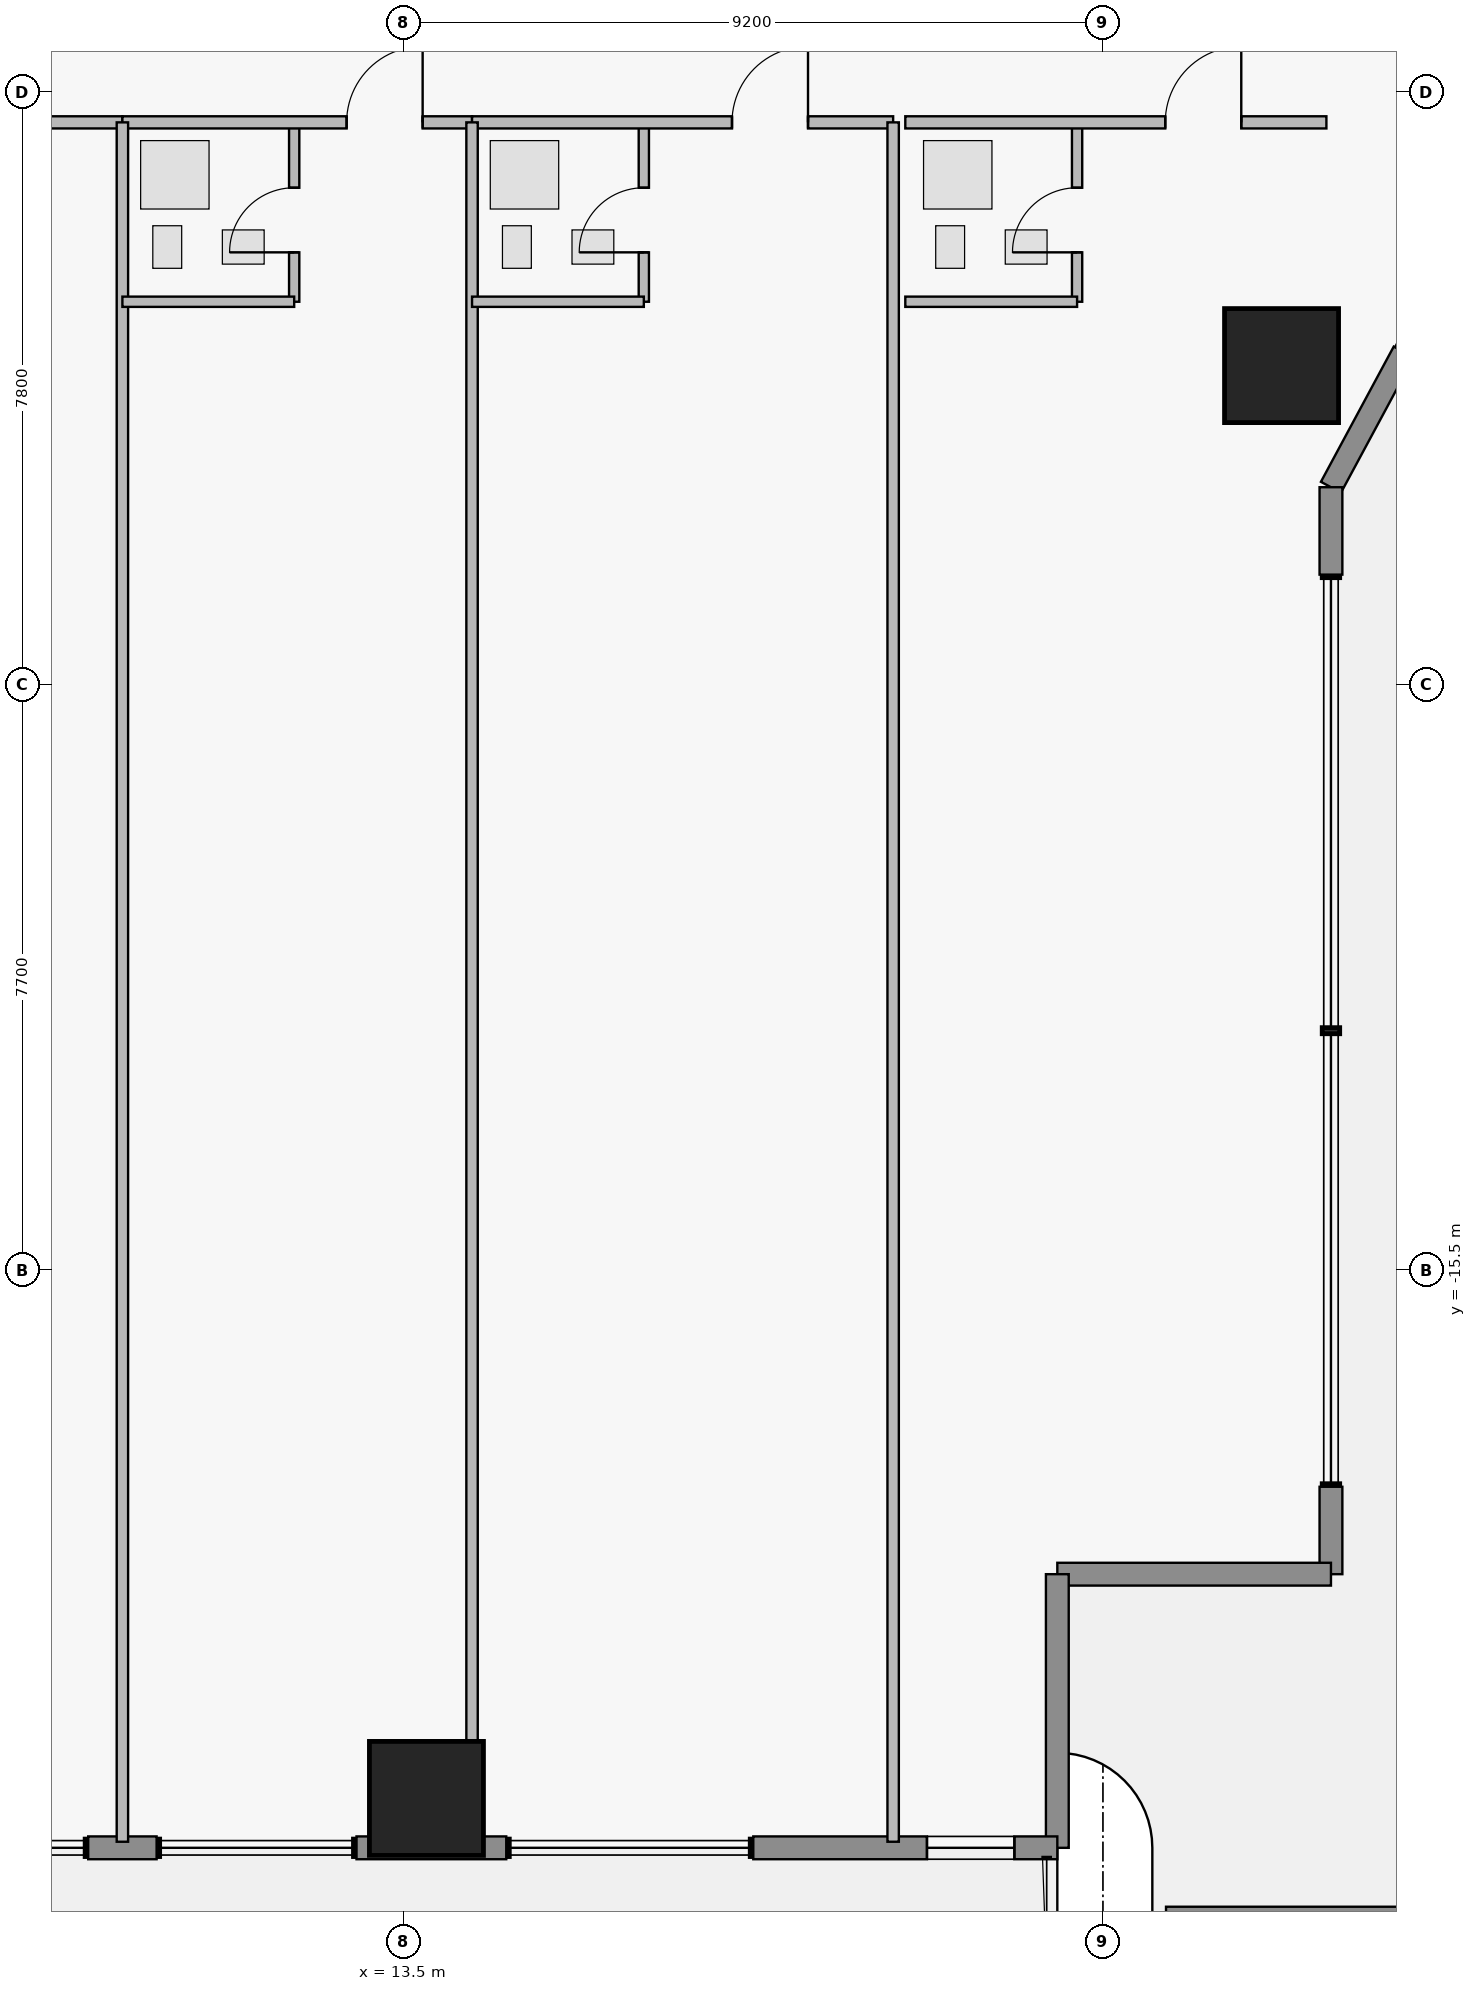
"""IFC4 building model, lengths in metres.
Left out: names, types, materials, properties, quantities, classifications, styles, units other than length and angle.
Written with IfcOpenShell. Run it as: python <this file> out.ifc"""

import sys

from ifc_helpers import new_model, si_unit, direction, frame, frame_2d, origin, origin_2d, place, context, subcontext, project, spatial, rectangle, extrude, element, fill, save


model = new_model("IFC4")
c1 = context("Model", 3, precision=1e-05, world=origin(), true_north=direction((0.0, 1.0)))
c2 = subcontext(c1, "Body", "Model", "MODEL_VIEW")
j1 = project(units=[si_unit("LENGTHUNIT", "METRE"), si_unit("PLANEANGLEUNIT", "RADIAN")], contexts=[c1])
p1 = place(None, origin())
s1 = spatial("IfcSite", under=j1, at=p1, CompositionType="ELEMENT")
p2 = place(p1, origin())
s2 = spatial("IfcBuilding", under=s1, at=p2, CompositionType="ELEMENT")
p3 = place(p2, frame((0.0, 0.0, 27.6)))
s3 = spatial("IfcBuildingStorey", under=s2, at=p3, CompositionType="ELEMENT", Elevation=27.6)
for number, where, z_axis, x_axis in (
    (1, (13.8, -22.45, 0.0), (0.0, 0.0, 1.0), (1.0, 0.0, 0.0)),
    (2, (25.05, -3.6, 0.0), (0.0, 0.0, 1.0), (1.0, 0.0, 0.0)),
):
    element("IfcColumn", number, at=place(p3, frame(where, z_axis=z_axis, x_axis=x_axis)), inside=s3, PredefinedType="COLUMN", context=c2, shape_type="SweptSolid", body=[
        extrude(rectangle(XDim=1.5, YDim=1.5, at=origin_2d()), origin(), (0.0, 0.0, 1.0), 3.65),
    ])
p4 = place(p3, frame((31.82, -24.0, 0.0), z_axis=(0.0, 0.0, 1.0), x_axis=(-1.0, 0.0, 0.0)))
e3 = element("IfcWall", 3, at=p4, inside=s3, PredefinedType="PARAPET", context=c2, shape_type="SweptSolid", body=[
    extrude(rectangle(XDim=8.29, YDim=0.25, at=frame_2d((4.145, 0.0))), origin(), (0.0, 0.0, 1.0), 1.15),
])
p5 = place(p3, frame((25.7, 5.2, 0.0), z_axis=(0.0, 0.0, 1.0), x_axis=(0.474109683532, -0.880465790352, 0.0)))
e4 = element("IfcWall", 4, at=p5, inside=s3, PredefinedType="STANDARD", context=c2, shape_type="SweptSolid", body=[
    extrude(rectangle(XDim=5.906, YDim=0.3, at=frame_2d((2.953, 0.0))), origin(), (0.0, 0.0, 1.0), 3.43),
])
p6 = place(p5, frame((2.324, 0.0, 0.95)))
e5 = element("IfcOpeningElement", 5, at=p6, cuts=e4, PredefinedType="OPENING", context=c2, shape_type="SweptSolid", body=[
    extrude(rectangle(XDim=1.15, YDim=1.55, at=frame_2d((0.575, 0.775))), frame((0.0, 0.16, 0.0), z_axis=(0.0, -1.0, 0.0), x_axis=(1.0, 0.0, 0.0)), (0.0, 0.0, 1.0), 0.32),
])
p7 = place(p3, frame((26.658, -3.421, 0.0), z_axis=(0.0, 0.0, 1.0), x_axis=(-0.474121438562, -0.88045946045, 0.0)))
e6 = element("IfcWall", 6, at=p7, inside=s3, PredefinedType="STANDARD", context=c2, shape_type="SweptSolid", body=[
    extrude(rectangle(XDim=2.021, YDim=0.3, at=frame_2d((1.01, 0.0))), origin(), (0.0, 0.0, 1.0), 3.43),
])
p8 = place(p3, frame((25.7, -5.2, 0.0), z_axis=(0.0, 0.0, 1.0), x_axis=(0.0, -1.0, 0.0)))
e7 = element("IfcWall", 7, at=p8, inside=s3, PredefinedType="STANDARD", context=c2, shape_type="SweptSolid", body=[
    extrude(rectangle(XDim=1.15, YDim=0.3, at=frame_2d((0.575, 0.0))), origin(), (0.0, 0.0, 1.0), 3.43),
])
p9 = place(p3, frame((25.7, -18.35, 0.0), z_axis=(0.0, 0.0, 1.0), x_axis=(0.0, -1.0, 0.0)))
e8 = element("IfcWall", 8, at=p9, inside=s3, PredefinedType="STANDARD", context=c2, shape_type="SweptSolid", body=[
    extrude(rectangle(XDim=1.15, YDim=0.3, at=frame_2d((0.575, 0.0))), origin(), (0.0, 0.0, 1.0), 3.43),
])
p10 = place(p3, frame((25.7, -19.5, 0.0), z_axis=(0.0, 0.0, 1.0), x_axis=(-1.0, 0.0, 0.0)))
e9 = element("IfcWall", 9, at=p10, inside=s3, PredefinedType="STANDARD", context=c2, shape_type="SweptSolid", body=[
    extrude(rectangle(XDim=3.6, YDim=0.3, at=frame_2d((1.8, 0.0))), origin(), (0.0, 0.0, 1.0), 3.43),
])
p11 = place(p3, frame((22.1, -19.5, 0.0), z_axis=(0.0, 0.0, 1.0), x_axis=(0.0, -1.0, 0.0)))
e10 = element("IfcWall", 10, at=p11, inside=s3, PredefinedType="STANDARD", context=c2, shape_type="SweptSolid", body=[
    extrude(rectangle(XDim=3.6, YDim=0.3, at=frame_2d((1.8, 0.0))), origin(), (0.0, 0.0, 1.0), 3.43),
])
p12 = place(p3, frame((22.1, -23.1, 0.0), z_axis=(0.0, 0.0, 1.0), x_axis=(-1.0, 0.0, 0.0)))
e11 = element("IfcWall", 11, at=p12, inside=s3, PredefinedType="STANDARD", context=c2, shape_type="SweptSolid", body=[
    extrude(rectangle(XDim=4.0, YDim=0.3, at=frame_2d((2.0, 0.0))), origin(), (0.0, 0.0, 1.0), 3.43),
])
p13 = place(p12, frame((0.565, 0.0, 0.95)))
e12 = element("IfcOpeningElement", 12, at=p13, cuts=e11, PredefinedType="OPENING", context=c2, shape_type="SweptSolid", body=[
    extrude(rectangle(XDim=1.15, YDim=1.55, at=frame_2d((0.575, 0.775))), frame((0.0, 0.16, 0.0), z_axis=(0.0, -1.0, 0.0), x_axis=(1.0, 0.0, 0.0)), (0.0, 0.0, 1.0), 0.32),
])
p14 = place(p3, frame((14.85, -23.1, 0.0), z_axis=(0.0, 0.0, 1.0), x_axis=(-1.0, 0.0, 0.0)))
e13 = element("IfcWall", 13, at=p14, inside=s3, PredefinedType="STANDARD", context=c2, shape_type="SweptSolid", body=[
    extrude(rectangle(XDim=1.97, YDim=0.3, at=frame_2d((0.985, 0.0))), origin(), (0.0, 0.0, 1.0), 3.43),
])
p15 = place(p3, frame((10.25, -23.1, 0.0), z_axis=(0.0, 0.0, 1.0), x_axis=(-1.0, 0.0, 0.0)))
e14 = element("IfcWall", 14, at=p15, inside=s3, PredefinedType="STANDARD", context=c2, shape_type="SweptSolid", body=[
    extrude(rectangle(XDim=0.9, YDim=0.3, at=frame_2d((0.45, 0.0))), origin(), (0.0, 0.0, 1.0), 3.43),
])
p16 = place(p3, frame((4.0, -0.4, 0.0), z_axis=(0.0, 0.0, 1.0), x_axis=(1.0, 0.0, 0.0)))
e15 = element("IfcWall", 15, at=p16, inside=s3, PredefinedType="PARTITIONING", context=c2, shape_type="SweptSolid", body=[
    extrude(rectangle(XDim=5.8, YDim=0.16, at=frame_2d((2.9, 0.0))), origin(), (0.0, 0.0, 1.0), 3.43),
])
p17 = place(p16, frame((3.55, 0.0, 0.0)))
e16 = element("IfcOpeningElement", 16, at=p17, cuts=e15, PredefinedType="OPENING", context=c2, shape_type="SweptSolid", body=[
    extrude(rectangle(XDim=1.0, YDim=2.15, at=frame_2d((0.5, 1.075))), frame((0.0, 0.09, 0.0), z_axis=(0.0, -1.0, 0.0), x_axis=(1.0, 0.0, 0.0)), (0.0, 0.0, 1.0), 0.18),
])
p18 = place(p3, frame((12.06, -2.76, 0.0), z_axis=(0.0, 0.0, 1.0), x_axis=(0.0, 1.0, 0.0)))
e17 = element("IfcWall", 17, at=p18, inside=s3, PredefinedType="PLUMBINGWALL", context=c2, shape_type="SweptSolid", body=[
    extrude(rectangle(XDim=2.36, YDim=0.135, at=frame_2d((1.18, 0.0))), origin(), (0.0, 0.0, 1.0), 3.43),
])
p19 = place(p18, frame((0.65, 0.0, 0.0)))
e18 = element("IfcOpeningElement", 18, at=p19, cuts=e17, PredefinedType="OPENING", context=c2, shape_type="SweptSolid", body=[
    extrude(rectangle(XDim=0.85, YDim=2.1, at=frame_2d((0.425, 1.05))), frame((0.0, 0.077, 0.0), z_axis=(0.0, -1.0, 0.0), x_axis=(1.0, 0.0, 0.0)), (0.0, 0.0, 1.0), 0.155),
])
p20 = place(p3, frame((9.8, -0.4, 0.0), z_axis=(0.0, 0.0, 1.0), x_axis=(1.0, 0.0, 0.0)))
e19 = element("IfcWall", 19, at=p20, inside=s3, PredefinedType="PARTITIONING", context=c2, shape_type="SweptSolid", body=[
    extrude(rectangle(XDim=4.6, YDim=0.16, at=frame_2d((2.3, 0.0))), origin(), (0.0, 0.0, 1.0), 3.43),
])
p21 = place(p20, frame((2.95, 0.0, 0.0)))
e20 = element("IfcOpeningElement", 20, at=p21, cuts=e19, PredefinedType="OPENING", context=c2, shape_type="SweptSolid", body=[
    extrude(rectangle(XDim=1.0, YDim=2.15, at=frame_2d((0.5, 1.075))), frame((0.0, 0.09, 0.0), z_axis=(0.0, -1.0, 0.0), x_axis=(1.0, 0.0, 0.0)), (0.0, 0.0, 1.0), 0.18),
])
p22 = place(p3, frame((16.66, -2.76, 0.0), z_axis=(0.0, 0.0, 1.0), x_axis=(0.0, 1.0, 0.0)))
e21 = element("IfcWall", 21, at=p22, inside=s3, PredefinedType="PLUMBINGWALL", context=c2, shape_type="SweptSolid", body=[
    extrude(rectangle(XDim=2.36, YDim=0.135, at=frame_2d((1.18, 0.0))), origin(), (0.0, 0.0, 1.0), 3.43),
])
p23 = place(p22, frame((0.65, 0.0, 0.0)))
e22 = element("IfcOpeningElement", 22, at=p23, cuts=e21, PredefinedType="OPENING", context=c2, shape_type="SweptSolid", body=[
    extrude(rectangle(XDim=0.85, YDim=2.1, at=frame_2d((0.425, 1.05))), frame((0.0, 0.077, 0.0), z_axis=(0.0, -1.0, 0.0), x_axis=(1.0, 0.0, 0.0)), (0.0, 0.0, 1.0), 0.155),
])
p24 = place(p3, frame((14.4, -0.4, 0.0), z_axis=(0.0, 0.0, 1.0), x_axis=(1.0, 0.0, 0.0)))
e23 = element("IfcWall", 23, at=p24, inside=s3, PredefinedType="PARTITIONING", context=c2, shape_type="SweptSolid", body=[
    extrude(rectangle(XDim=5.54, YDim=0.16, at=frame_2d((2.77, 0.0))), origin(), (0.0, 0.0, 1.0), 3.43),
])
p25 = place(p24, frame((3.42, 0.0, 0.0)))
e24 = element("IfcOpeningElement", 24, at=p25, cuts=e23, PredefinedType="OPENING", context=c2, shape_type="SweptSolid", body=[
    extrude(rectangle(XDim=1.0, YDim=2.15, at=frame_2d((0.5, 1.075))), frame((0.0, 0.09, 0.0), z_axis=(0.0, -1.0, 0.0), x_axis=(1.0, 0.0, 0.0)), (0.0, 0.0, 1.0), 0.18),
])
p26 = place(p3, frame((22.36, -2.76, 0.0), z_axis=(0.0, 0.0, 1.0), x_axis=(0.0, 1.0, 0.0)))
e25 = element("IfcWall", 25, at=p26, inside=s3, PredefinedType="PLUMBINGWALL", context=c2, shape_type="SweptSolid", body=[
    extrude(rectangle(XDim=2.36, YDim=0.135, at=frame_2d((1.18, 0.0))), origin(), (0.0, 0.0, 1.0), 3.43),
])
p27 = place(p26, frame((0.65, 0.0, 0.0)))
e26 = element("IfcOpeningElement", 26, at=p27, cuts=e25, PredefinedType="OPENING", context=c2, shape_type="SweptSolid", body=[
    extrude(rectangle(XDim=0.85, YDim=2.1, at=frame_2d((0.425, 1.05))), frame((0.0, 0.077, 0.0), z_axis=(0.0, -1.0, 0.0), x_axis=(1.0, 0.0, 0.0)), (0.0, 0.0, 1.0), 0.155),
])
p28 = place(p3, frame((20.1, -0.4, 0.0), z_axis=(0.0, 0.0, 1.0), x_axis=(1.0, 0.0, 0.0)))
e27 = element("IfcWall", 27, at=p28, inside=s3, PredefinedType="PARTITIONING", context=c2, shape_type="SweptSolid", body=[
    extrude(rectangle(XDim=5.54, YDim=0.16, at=frame_2d((2.77, 0.0))), origin(), (0.0, 0.0, 1.0), 3.43),
])
p29 = place(p28, frame((3.42, 0.0, 0.0)))
e28 = element("IfcOpeningElement", 28, at=p29, cuts=e27, PredefinedType="OPENING", context=c2, shape_type="SweptSolid", body=[
    extrude(rectangle(XDim=1.0, YDim=2.15, at=frame_2d((0.5, 1.075))), frame((0.0, 0.09, 0.0), z_axis=(0.0, -1.0, 0.0), x_axis=(1.0, 0.0, 0.0)), (0.0, 0.0, 1.0), 0.18),
])
p30 = place(p3, frame((9.8, -23.02, 0.0), z_axis=(0.0, 0.0, 1.0), x_axis=(0.0, 1.0, 0.0)))
e29 = element("IfcWall", 29, at=p30, inside=s3, PredefinedType="PARTITIONING", context=c2, shape_type="SweptSolid", body=[
    extrude(rectangle(XDim=22.62, YDim=0.15, at=frame_2d((11.31, 0.0))), origin(), (0.0, 0.0, 1.0), 3.43),
])
p31 = place(p3, frame((9.8, -2.76, 0.0), z_axis=(0.0, 0.0, 1.0), x_axis=(1.0, 0.0, 0.0)))
e30 = element("IfcWall", 30, at=p31, inside=s3, PredefinedType="PLUMBINGWALL", context=c2, shape_type="SweptSolid", body=[
    extrude(rectangle(XDim=2.26, YDim=0.135, at=frame_2d((1.13, 0.0))), origin(), (0.0, 0.0, 1.0), 3.43),
])
p32 = place(p3, frame((14.4, -23.02, 0.0), z_axis=(0.0, 0.0, 1.0), x_axis=(0.0, 1.0, 0.0)))
e31 = element("IfcWall", 31, at=p32, inside=s3, PredefinedType="PARTITIONING", context=c2, shape_type="SweptSolid", body=[
    extrude(rectangle(XDim=22.62, YDim=0.15, at=frame_2d((11.31, 0.0))), origin(), (0.0, 0.0, 1.0), 3.43),
])
p33 = place(p3, frame((14.4, -2.76, 0.0), z_axis=(0.0, 0.0, 1.0), x_axis=(1.0, 0.0, 0.0)))
e32 = element("IfcWall", 32, at=p33, inside=s3, PredefinedType="PLUMBINGWALL", context=c2, shape_type="SweptSolid", body=[
    extrude(rectangle(XDim=2.26, YDim=0.135, at=frame_2d((1.13, 0.0))), origin(), (0.0, 0.0, 1.0), 3.43),
])
p34 = place(p3, frame((19.94, -23.02, 0.0), z_axis=(0.0, 0.0, 1.0), x_axis=(0.0, 1.0, 0.0)))
e33 = element("IfcWall", 33, at=p34, inside=s3, PredefinedType="PARTITIONING", context=c2, shape_type="SweptSolid", body=[
    extrude(rectangle(XDim=22.62, YDim=0.15, at=frame_2d((11.31, 0.0))), origin(), (0.0, 0.0, 1.0), 3.43),
])
p35 = place(p3, frame((20.1, -2.76, 0.0), z_axis=(0.0, 0.0, 1.0), x_axis=(1.0, 0.0, 0.0)))
e34 = element("IfcWall", 34, at=p35, inside=s3, PredefinedType="PLUMBINGWALL", context=c2, shape_type="SweptSolid", body=[
    extrude(rectangle(XDim=2.26, YDim=0.135, at=frame_2d((1.13, 0.0))), origin(), (0.0, 0.0, 1.0), 3.43),
])
p36 = place(p13, origin())
e35 = element("IfcWindow", 35, at=p36, inside=s3, PartitioningType="SINGLE_PANEL", PredefinedType="WINDOW", context=c2, shape_type="SweptSolid", body=[
    extrude(rectangle(XDim=1.15, YDim=1.55, at=frame_2d((0.575, 0.775))), frame((0.0, 0.03, 0.0), z_axis=(0.0, -1.0, 0.0), x_axis=(1.0, 0.0, 0.0)), (0.0, 0.0, 1.0), 0.06),
])
fill(e12, e35)
p37 = place(p19, origin())
e36 = element("IfcDoor", 36, at=p37, inside=s3, OperationType="SINGLE_SWING_LEFT", PredefinedType="DOOR", context=c2, shape_type="SweptSolid", body=[
    extrude(rectangle(XDim=0.85, YDim=2.1, at=frame_2d((0.425, 1.05))), frame((0.0, 0.025, 0.0), z_axis=(0.0, -1.0, 0.0), x_axis=(1.0, 0.0, 0.0)), (0.0, 0.0, 1.0), 0.05),
])
fill(e18, e36)
p38 = place(p21, origin())
e37 = element("IfcDoor", 37, at=p38, inside=s3, OperationType="SINGLE_SWING_RIGHT", PredefinedType="DOOR", context=c2, shape_type="SweptSolid", body=[
    extrude(rectangle(XDim=1.0, YDim=2.15, at=frame_2d((0.5, 1.075))), frame((0.0, 0.025, 0.0), z_axis=(0.0, -1.0, 0.0), x_axis=(1.0, 0.0, 0.0)), (0.0, 0.0, 1.0), 0.05),
])
fill(e20, e37)
p39 = place(p23, origin())
e38 = element("IfcDoor", 38, at=p39, inside=s3, OperationType="SINGLE_SWING_LEFT", PredefinedType="DOOR", context=c2, shape_type="SweptSolid", body=[
    extrude(rectangle(XDim=0.85, YDim=2.1, at=frame_2d((0.425, 1.05))), frame((0.0, 0.025, 0.0), z_axis=(0.0, -1.0, 0.0), x_axis=(1.0, 0.0, 0.0)), (0.0, 0.0, 1.0), 0.05),
])
fill(e22, e38)
p40 = place(p25, origin())
e39 = element("IfcDoor", 39, at=p40, inside=s3, OperationType="SINGLE_SWING_RIGHT", PredefinedType="DOOR", context=c2, shape_type="SweptSolid", body=[
    extrude(rectangle(XDim=1.0, YDim=2.15, at=frame_2d((0.5, 1.075))), frame((0.0, 0.025, 0.0), z_axis=(0.0, -1.0, 0.0), x_axis=(1.0, 0.0, 0.0)), (0.0, 0.0, 1.0), 0.05),
])
fill(e24, e39)
p41 = place(p27, origin())
e40 = element("IfcDoor", 40, at=p41, inside=s3, OperationType="SINGLE_SWING_LEFT", PredefinedType="DOOR", context=c2, shape_type="SweptSolid", body=[
    extrude(rectangle(XDim=0.85, YDim=2.1, at=frame_2d((0.425, 1.05))), frame((0.0, 0.025, 0.0), z_axis=(0.0, -1.0, 0.0), x_axis=(1.0, 0.0, 0.0)), (0.0, 0.0, 1.0), 0.05),
])
fill(e26, e40)
p42 = place(p29, origin())
e41 = element("IfcDoor", 41, at=p42, inside=s3, OperationType="SINGLE_SWING_RIGHT", PredefinedType="DOOR", context=c2, shape_type="SweptSolid", body=[
    extrude(rectangle(XDim=1.0, YDim=2.15, at=frame_2d((0.5, 1.075))), frame((0.0, 0.025, 0.0), z_axis=(0.0, -1.0, 0.0), x_axis=(1.0, 0.0, 0.0)), (0.0, 0.0, 1.0), 0.05),
])
fill(e28, e41)
save(model, sys.argv[1])
